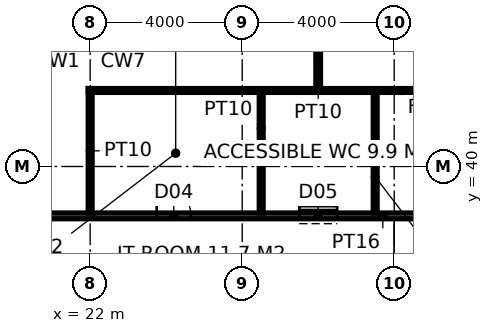
"""IFC4 building model, lengths in metres.
Left out: names, types, materials, properties, quantities, classifications, styles, units other than length and angle.
Written with IfcOpenShell. Run it as: python <this file> out.ifc"""

import sys

from ifc_helpers import new_model, si_unit, direction, frame, frame_2d, origin, place, context, subcontext, project, spatial, rectangle, extrude, element, fill, save


model = new_model("IFC4")
c1 = context("Model", 3, precision=1e-05, world=origin(), true_north=direction((0.0, 1.0)))
c2 = subcontext(c1, "Body", "Model", "MODEL_VIEW")
j1 = project(units=[si_unit("LENGTHUNIT", "METRE"), si_unit("PLANEANGLEUNIT", "RADIAN")], contexts=[c1])
p1 = place(None, origin())
s1 = spatial("IfcSite", under=j1, at=p1, CompositionType="ELEMENT")
p2 = place(p1, origin())
s2 = spatial("IfcBuilding", under=s1, at=p2, CompositionType="ELEMENT")
p3 = place(p2, frame((0.0, 0.0, 6.0)))
s3 = spatial("IfcBuildingStorey", under=s2, at=p3, CompositionType="ELEMENT", Elevation=6.0)
p4 = place(p3, frame((15.175, 38.7, 0.0), z_axis=(0.0, 0.0, 1.0), x_axis=(1.0, 0.0, 0.0)))
e1 = element("IfcWall", 1, at=p4, inside=s3, PredefinedType="PARTITIONING", context=c2, shape_type="SweptSolid", body=[
    extrude(rectangle(XDim=29.05, YDim=0.15, at=frame_2d((14.525, 0.0))), origin(), (0.0, 0.0, 1.0), 4.85),
])
p5 = place(p4, frame((8.575, 0.0, 0.0)))
e2 = element("IfcOpeningElement", 2, at=p5, cuts=e1, PredefinedType="OPENING", context=c2, shape_type="SweptSolid", body=[
    extrude(rectangle(XDim=0.9, YDim=2.1, at=frame_2d((0.45, 1.05))), frame((0.0, 0.085, 0.0), z_axis=(0.0, -1.0, 0.0), x_axis=(1.0, 0.0, 0.0)), (0.0, 0.0, 1.0), 0.17),
])
p6 = place(p4, frame((12.325, 0.0, 0.0)))
e3 = element("IfcOpeningElement", 3, at=p6, cuts=e1, PredefinedType="OPENING", context=c2, shape_type="SweptSolid", body=[
    extrude(rectangle(XDim=1.0, YDim=2.1, at=frame_2d((0.5, 1.05))), frame((0.0, 0.085, 0.0), z_axis=(0.0, -1.0, 0.0), x_axis=(1.0, 0.0, 0.0)), (0.0, 0.0, 1.0), 0.17),
])
p7 = place(p4, frame((16.175, 0.0, 0.0)))
e4 = element("IfcOpeningElement", 4, at=p7, cuts=e1, PredefinedType="OPENING", context=c2, shape_type="SweptSolid", body=[
    extrude(rectangle(XDim=0.9, YDim=2.1, at=frame_2d((0.45, 1.05))), frame((0.0, 0.085, 0.0), z_axis=(0.0, -1.0, 0.0), x_axis=(1.0, 0.0, 0.0)), (0.0, 0.0, 1.0), 0.17),
])
p8 = place(p3, frame((22.0, 38.775, 0.0), z_axis=(0.0, 0.0, 1.0), x_axis=(0.0, 1.0, 0.0)))
e5 = element("IfcWall", 5, at=p8, inside=s3, PredefinedType="PARTITIONING", context=c2, shape_type="SweptSolid", body=[
    extrude(rectangle(XDim=3.275, YDim=0.1, at=frame_2d((1.638, 0.0))), origin(), (0.0, 0.0, 1.0), 3.65),
])
p9 = place(p3, frame((21.95, 42.0, 0.0), z_axis=(0.0, 0.0, 1.0), x_axis=(1.0, 0.0, 0.0)))
e6 = element("IfcWall", 6, at=p9, inside=s3, PredefinedType="PARTITIONING", context=c2, shape_type="SweptSolid", body=[
    extrude(rectangle(XDim=12.1, YDim=0.1, at=frame_2d((6.05, 0.0))), origin(), (0.0, 0.0, 1.0), 4.85),
])
for number, where, z_axis, x_axis in (
    (7, (26.5, 38.775, 0.0), (0.0, 0.0, 1.0), (0.0, 1.0, 0.0)),
    (8, (29.5, 38.775, 0.0), (0.0, 0.0, 1.0), (0.0, 1.0, 0.0)),
):
    element("IfcWall", number, at=place(p3, frame(where, z_axis=z_axis, x_axis=x_axis)), inside=s3, PredefinedType="PARTITIONING", context=c2, shape_type="SweptSolid", body=[
        extrude(rectangle(XDim=3.175, YDim=0.1, at=frame_2d((1.587, 0.0))), origin(), (0.0, 0.0, 1.0), 3.65),
    ])
p10 = place(p3, frame((28.0, 42.05, 0.0), z_axis=(0.0, 0.0, 1.0), x_axis=(0.0, 1.0, 0.0)))
e9 = element("IfcWall", 9, at=p10, inside=s3, PredefinedType="PARTITIONING", context=c2, shape_type="SweptSolid", body=[
    extrude(rectangle(XDim=1.65, YDim=0.12, at=frame_2d((0.825, 0.0))), origin(), (0.0, 0.0, 1.0), 4.85),
])
p11 = place(p5, origin())
e10 = element("IfcDoor", 10, at=p11, inside=s3, OperationType="SINGLE_SWING_LEFT", PredefinedType="DOOR", context=c2, shape_type="SweptSolid", body=[
    extrude(rectangle(XDim=0.9, YDim=2.1, at=frame_2d((0.45, 1.05))), frame((0.0, 0.025, 0.0), z_axis=(0.0, -1.0, 0.0), x_axis=(1.0, 0.0, 0.0)), (0.0, 0.0, 1.0), 0.05),
])
fill(e2, e10)
p12 = place(p6, origin())
e11 = element("IfcDoor", 11, at=p12, inside=s3, OperationType="SLIDING_TO_LEFT", PredefinedType="DOOR", context=c2, shape_type="SweptSolid", body=[
    extrude(rectangle(XDim=1.0, YDim=2.1, at=frame_2d((0.5, 1.05))), frame((0.0, 0.025, 0.0), z_axis=(0.0, -1.0, 0.0), x_axis=(1.0, 0.0, 0.0)), (0.0, 0.0, 1.0), 0.05),
])
fill(e3, e11)
save(model, sys.argv[1])
